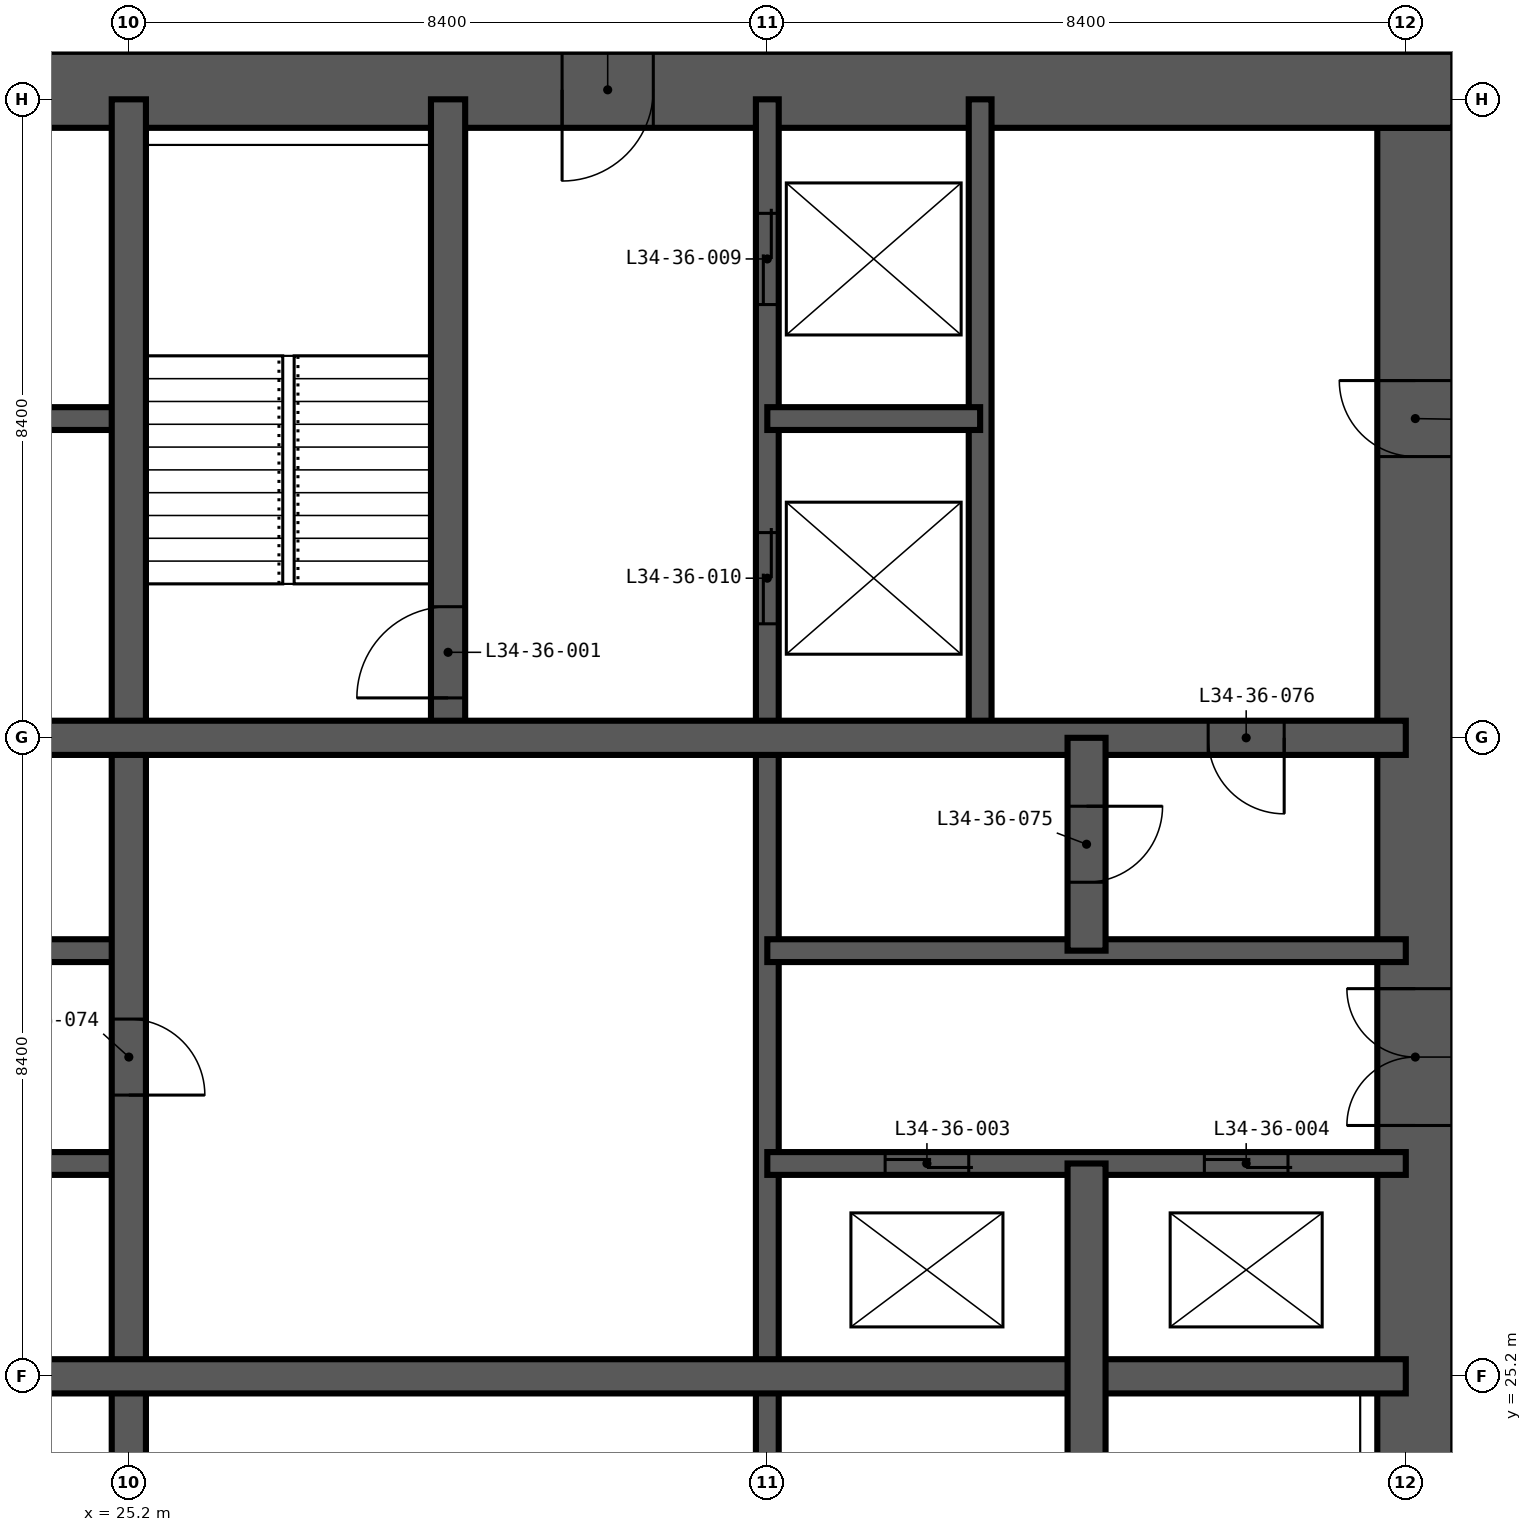
"""IFC4 building model, lengths in metres.
Left out: names, types, materials, properties, quantities, classifications, styles, units other than length and angle.
Written with IfcOpenShell. Run it as: python <this file> out.ifc"""

import sys

from ifc_helpers import new_model, si_unit, direction, frame, frame_2d, origin, place, context, subcontext, project, spatial, rectangle, extrude, element, fill, save


model = new_model("IFC4")
c1 = context("Model", 3, precision=1e-05, world=origin(), true_north=direction((0.0, 1.0)))
c2 = subcontext(c1, "Body", "Model", "MODEL_VIEW")
j1 = project(units=[si_unit("LENGTHUNIT", "METRE"), si_unit("PLANEANGLEUNIT", "RADIAN")], contexts=[c1])
p1 = place(None, origin())
s1 = spatial("IfcSite", under=j1, at=p1, CompositionType="ELEMENT")
p2 = place(p1, origin())
s2 = spatial("IfcBuilding", under=s1, at=p2, CompositionType="ELEMENT")
p3 = place(p2, frame((0.0, 0.0, 133.2)))
s3 = spatial("IfcBuildingStorey", under=s2, at=p3, CompositionType="ELEMENT", Elevation=133.2)
p4 = place(p3, frame((42.125, 17.175, -0.35), z_axis=(0.0, 0.0, 1.0), x_axis=(0.0, 1.0, 0.0)))
e1 = element("IfcWall", 1, at=p4, inside=s3, PredefinedType="SHEAR", context=c2, shape_type="SweptSolid", body=[
    extrude(rectangle(XDim=24.45, YDim=1.0, at=frame_2d((12.225, 0.0))), origin(), (0.0, 0.0, 1.0), 3.6),
])
p5 = place(p4, frame((0.425, 0.0, 0.35)))
e2 = element("IfcOpeningElement", 2, at=p5, cuts=e1, PredefinedType="OPENING", context=c2, shape_type="SweptSolid", body=[
    extrude(rectangle(XDim=1.2, YDim=2.2, at=frame_2d((0.6, 1.1))), frame((0.0, 0.51, 0.0), z_axis=(0.0, -1.0, 0.0), x_axis=(1.0, 0.0, 0.0)), (0.0, 0.0, 1.0), 1.02),
])
p6 = place(p4, frame((11.325, 0.0, 0.35)))
e3 = element("IfcOpeningElement", 3, at=p6, cuts=e1, PredefinedType="OPENING", context=c2, shape_type="SweptSolid", body=[
    extrude(rectangle(XDim=1.8, YDim=2.2, at=frame_2d((0.9, 1.1))), frame((0.0, 0.51, 0.0), z_axis=(0.0, -1.0, 0.0), x_axis=(1.0, 0.0, 0.0)), (0.0, 0.0, 1.0), 1.02),
])
p7 = place(p4, frame((20.125, 0.0, 0.35)))
e4 = element("IfcOpeningElement", 4, at=p7, cuts=e1, PredefinedType="OPENING", context=c2, shape_type="SweptSolid", body=[
    extrude(rectangle(XDim=1.0, YDim=2.1, at=frame_2d((0.5, 1.05))), frame((0.0, 0.51, 0.0), z_axis=(0.0, -1.0, 0.0), x_axis=(1.0, 0.0, 0.0)), (0.0, 0.0, 1.0), 1.02),
])
p8 = place(p3, frame((42.625, 42.125, -0.35), z_axis=(0.0, 0.0, 1.0), x_axis=(-1.0, 0.0, 0.0)))
e5 = element("IfcWall", 5, at=p8, inside=s3, PredefinedType="SHEAR", context=c2, shape_type="SweptSolid", body=[
    extrude(rectangle(XDim=26.45, YDim=1.0, at=frame_2d((13.225, 0.0))), origin(), (0.0, 0.0, 1.0), 3.6),
])
p9 = place(p8, frame((21.125, 0.0, 0.35)))
e6 = element("IfcOpeningElement", 6, at=p9, cuts=e5, PredefinedType="OPENING", context=c2, shape_type="SweptSolid", body=[
    extrude(rectangle(XDim=1.0, YDim=2.1, at=frame_2d((0.5, 1.05))), frame((0.0, 0.51, 0.0), z_axis=(0.0, -1.0, 0.0), x_axis=(1.0, 0.0, 0.0)), (0.0, 0.0, 1.0), 1.02),
])
p10 = place(p8, frame((10.525, 0.0, 0.35)))
e7 = element("IfcOpeningElement", 7, at=p10, cuts=e5, PredefinedType="OPENING", context=c2, shape_type="SweptSolid", body=[
    extrude(rectangle(XDim=1.2, YDim=2.2, at=frame_2d((0.6, 1.1))), frame((0.0, 0.51, 0.0), z_axis=(0.0, -1.0, 0.0), x_axis=(1.0, 0.0, 0.0)), (0.0, 0.0, 1.0), 1.02),
])
p11 = place(p3, frame((33.6, 16.8, -0.35), z_axis=(0.0, 0.0, 1.0), x_axis=(0.0, 1.0, 0.0)))
e8 = element("IfcWall", 8, at=p11, inside=s3, PredefinedType="SHEAR", context=c2, shape_type="SweptSolid", body=[
    extrude(rectangle(XDim=25.2, YDim=0.3, at=frame_2d((12.6, 0.0))), origin(), (0.0, 0.0, 1.0), 3.6),
])
p12 = place(p11, frame((22.5, 0.0, 0.35)))
e9 = element("IfcOpeningElement", 9, at=p12, cuts=e8, PredefinedType="OPENING", context=c2, shape_type="SweptSolid", body=[
    extrude(rectangle(XDim=1.2, YDim=2.2, at=frame_2d((0.6, 1.1))), frame((0.0, 0.16, 0.0), z_axis=(0.0, -1.0, 0.0), x_axis=(1.0, 0.0, 0.0)), (0.0, 0.0, 1.0), 0.32),
])
p13 = place(p11, frame((18.3, 0.0, 0.35)))
e10 = element("IfcOpeningElement", 10, at=p13, cuts=e8, PredefinedType="OPENING", context=c2, shape_type="SweptSolid", body=[
    extrude(rectangle(XDim=1.2, YDim=2.2, at=frame_2d((0.6, 1.1))), frame((0.0, 0.16, 0.0), z_axis=(0.0, -1.0, 0.0), x_axis=(1.0, 0.0, 0.0)), (0.0, 0.0, 1.0), 0.32),
])
p14 = place(p3, frame((36.4, 33.6, -0.35), z_axis=(0.0, 0.0, 1.0), x_axis=(0.0, 1.0, 0.0)))
e11 = element("IfcWall", 11, at=p14, inside=s3, PredefinedType="SHEAR", context=c2, shape_type="SweptSolid", body=[
    extrude(rectangle(XDim=8.4, YDim=0.3, at=frame_2d((4.2, 0.0))), origin(), (0.0, 0.0, 1.0), 3.6),
])
p15 = place(p3, frame((16.8, 28.0, -0.35), z_axis=(0.0, 0.0, 1.0), x_axis=(1.0, 0.0, 0.0)))
e12 = element("IfcWall", 12, at=p15, inside=s3, PredefinedType="SHEAR", context=c2, shape_type="SweptSolid", body=[
    extrude(rectangle(XDim=8.4, YDim=0.3, at=frame_2d((4.2, 0.0))), origin(), (0.0, 0.0, 1.0), 3.6),
])
p16 = place(p15, frame((1.55, 0.0, 0.35)))
e13 = element("IfcOpeningElement", 13, at=p16, cuts=e12, PredefinedType="OPENING", context=c2, shape_type="SweptSolid", body=[
    extrude(rectangle(XDim=1.1, YDim=2.2, at=frame_2d((0.55, 1.1))), frame((0.0, 0.16, 0.0), z_axis=(0.0, -1.0, 0.0), x_axis=(1.0, 0.0, 0.0)), (0.0, 0.0, 1.0), 0.32),
])
p17 = place(p15, frame((5.75, 0.0, 0.35)))
e14 = element("IfcOpeningElement", 14, at=p17, cuts=e12, PredefinedType="OPENING", context=c2, shape_type="SweptSolid", body=[
    extrude(rectangle(XDim=1.1, YDim=2.2, at=frame_2d((0.55, 1.1))), frame((0.0, 0.16, 0.0), z_axis=(0.0, -1.0, 0.0), x_axis=(1.0, 0.0, 0.0)), (0.0, 0.0, 1.0), 0.32),
])
p18 = place(p3, frame((33.6, 28.0, -0.35), z_axis=(0.0, 0.0, 1.0), x_axis=(1.0, 0.0, 0.0)))
e15 = element("IfcWall", 15, at=p18, inside=s3, PredefinedType="SHEAR", context=c2, shape_type="SweptSolid", body=[
    extrude(rectangle(XDim=8.4, YDim=0.3, at=frame_2d((4.2, 0.0))), origin(), (0.0, 0.0, 1.0), 3.6),
])
p19 = place(p18, frame((1.55, 0.0, 0.35)))
e16 = element("IfcOpeningElement", 16, at=p19, cuts=e15, PredefinedType="OPENING", context=c2, shape_type="SweptSolid", body=[
    extrude(rectangle(XDim=1.1, YDim=2.2, at=frame_2d((0.55, 1.1))), frame((0.0, 0.16, 0.0), z_axis=(0.0, -1.0, 0.0), x_axis=(1.0, 0.0, 0.0)), (0.0, 0.0, 1.0), 0.32),
])
p20 = place(p18, frame((5.75, 0.0, 0.35)))
e17 = element("IfcOpeningElement", 17, at=p20, cuts=e15, PredefinedType="OPENING", context=c2, shape_type="SweptSolid", body=[
    extrude(rectangle(XDim=1.1, YDim=2.2, at=frame_2d((0.55, 1.1))), frame((0.0, 0.16, 0.0), z_axis=(0.0, -1.0, 0.0), x_axis=(1.0, 0.0, 0.0)), (0.0, 0.0, 1.0), 0.32),
])
p21 = place(p3, frame((16.8, 30.8, -0.35), z_axis=(0.0, 0.0, 1.0), x_axis=(1.0, 0.0, 0.0)))
e18 = element("IfcWall", 18, at=p21, inside=s3, PredefinedType="SHEAR", context=c2, shape_type="SweptSolid", body=[
    extrude(rectangle(XDim=8.4, YDim=0.3, at=frame_2d((4.2, 0.0))), origin(), (0.0, 0.0, 1.0), 3.6),
])
p22 = place(p21, frame((1.55, 0.0, 0.35)))
e19 = element("IfcOpeningElement", 19, at=p22, cuts=e18, PredefinedType="OPENING", context=c2, shape_type="SweptSolid", body=[
    extrude(rectangle(XDim=1.1, YDim=2.2, at=frame_2d((0.55, 1.1))), frame((0.0, 0.16, 0.0), z_axis=(0.0, -1.0, 0.0), x_axis=(1.0, 0.0, 0.0)), (0.0, 0.0, 1.0), 0.32),
])
p23 = place(p21, frame((5.75, 0.0, 0.35)))
e20 = element("IfcOpeningElement", 20, at=p23, cuts=e18, PredefinedType="OPENING", context=c2, shape_type="SweptSolid", body=[
    extrude(rectangle(XDim=1.1, YDim=2.2, at=frame_2d((0.55, 1.1))), frame((0.0, 0.16, 0.0), z_axis=(0.0, -1.0, 0.0), x_axis=(1.0, 0.0, 0.0)), (0.0, 0.0, 1.0), 0.32),
])
for number, where, z_axis, x_axis in (
    (21, (33.6, 30.8, -0.35), (0.0, 0.0, 1.0), (1.0, 0.0, 0.0)),
    (22, (16.8, 37.8, -0.35), (0.0, 0.0, 1.0), (1.0, 0.0, 0.0)),
):
    element("IfcWall", number, at=place(p3, frame(where, z_axis=z_axis, x_axis=x_axis)), inside=s3, PredefinedType="SHEAR", context=c2, shape_type="SweptSolid", body=[
        extrude(rectangle(XDim=8.4, YDim=0.3, at=frame_2d((4.2, 0.0))), origin(), (0.0, 0.0, 1.0), 3.6),
    ])
p24 = place(p3, frame((33.6, 37.8, -0.35), z_axis=(0.0, 0.0, 1.0), x_axis=(1.0, 0.0, 0.0)))
e23 = element("IfcWall", 23, at=p24, inside=s3, PredefinedType="SHEAR", context=c2, shape_type="SweptSolid", body=[
    extrude(rectangle(XDim=2.8, YDim=0.3, at=frame_2d((1.4, 0.0))), origin(), (0.0, 0.0, 1.0), 3.6),
])
p25 = place(p3, frame((25.2, 16.8, -0.35), z_axis=(0.0, 0.0, 1.0), x_axis=(0.0, 1.0, 0.0)))
e24 = element("IfcWall", 24, at=p25, inside=s3, PredefinedType="SHEAR", context=c2, shape_type="SweptSolid", body=[
    extrude(rectangle(XDim=25.2, YDim=0.45, at=frame_2d((12.6, 0.0))), origin(), (0.0, 0.0, 1.0), 3.6),
])
p26 = place(p25, frame((12.1, 0.0, 0.35)))
e25 = element("IfcOpeningElement", 25, at=p26, cuts=e24, PredefinedType="OPENING", context=c2, shape_type="SweptSolid", body=[
    extrude(rectangle(XDim=1.0, YDim=2.1, at=frame_2d((0.5, 1.05))), frame((0.0, 0.235, 0.0), z_axis=(0.0, -1.0, 0.0), x_axis=(1.0, 0.0, 0.0)), (0.0, 0.0, 1.0), 0.47),
])
p27 = place(p3, frame((29.4, 33.6, -0.35), z_axis=(0.0, 0.0, 1.0), x_axis=(0.0, 1.0, 0.0)))
e26 = element("IfcWall", 26, at=p27, inside=s3, PredefinedType="SHEAR", context=c2, shape_type="SweptSolid", body=[
    extrude(rectangle(XDim=8.4, YDim=0.45, at=frame_2d((4.2, 0.0))), origin(), (0.0, 0.0, 1.0), 3.6),
])
p28 = place(p27, frame((0.525, 0.0, 0.35)))
e27 = element("IfcOpeningElement", 27, at=p28, cuts=e26, PredefinedType="OPENING", context=c2, shape_type="SweptSolid", body=[
    extrude(rectangle(XDim=1.2, YDim=2.2, at=frame_2d((0.6, 1.1))), frame((0.0, 0.235, 0.0), z_axis=(0.0, -1.0, 0.0), x_axis=(1.0, 0.0, 0.0)), (0.0, 0.0, 1.0), 0.47),
])
p29 = place(p3, frame((16.8, 25.2, -0.35), z_axis=(0.0, 0.0, 1.0), x_axis=(1.0, 0.0, 0.0)))
e28 = element("IfcWall", 28, at=p29, inside=s3, PredefinedType="SHEAR", context=c2, shape_type="SweptSolid", body=[
    extrude(rectangle(XDim=25.2, YDim=0.45, at=frame_2d((12.6, 0.0))), origin(), (0.0, 0.0, 1.0), 3.6),
])
p30 = place(p3, frame((16.8, 33.6, -0.35), z_axis=(0.0, 0.0, 1.0), x_axis=(1.0, 0.0, 0.0)))
e29 = element("IfcWall", 29, at=p30, inside=s3, PredefinedType="SHEAR", context=c2, shape_type="SweptSolid", body=[
    extrude(rectangle(XDim=25.2, YDim=0.45, at=frame_2d((12.6, 0.0))), origin(), (0.0, 0.0, 1.0), 3.6),
])
p31 = place(p30, frame((22.6, 0.0, 0.35)))
e30 = element("IfcOpeningElement", 30, at=p31, cuts=e29, PredefinedType="OPENING", context=c2, shape_type="SweptSolid", body=[
    extrude(rectangle(XDim=1.0, YDim=2.1, at=frame_2d((0.5, 1.05))), frame((0.0, 0.235, 0.0), z_axis=(0.0, -1.0, 0.0), x_axis=(1.0, 0.0, 0.0)), (0.0, 0.0, 1.0), 0.47),
])
p32 = place(p3, frame((37.8, 16.8, -0.35), z_axis=(0.0, 0.0, 1.0), x_axis=(0.0, 1.0, 0.0)))
e31 = element("IfcWall", 31, at=p32, inside=s3, PredefinedType="SHEAR", context=c2, shape_type="SweptSolid", body=[
    extrude(rectangle(XDim=11.2, YDim=0.5, at=frame_2d((5.6, 0.0))), origin(), (0.0, 0.0, 1.0), 3.6),
])
p33 = place(p3, frame((37.8, 30.8, -0.35), z_axis=(0.0, 0.0, 1.0), x_axis=(0.0, 1.0, 0.0)))
e32 = element("IfcWall", 32, at=p33, inside=s3, PredefinedType="SHEAR", context=c2, shape_type="SweptSolid", body=[
    extrude(rectangle(XDim=2.8, YDim=0.5, at=frame_2d((1.4, 0.0))), origin(), (0.0, 0.0, 1.0), 3.6),
])
p34 = place(p33, frame((0.9, 0.0, 0.35)))
e33 = element("IfcOpeningElement", 33, at=p34, cuts=e32, PredefinedType="OPENING", context=c2, shape_type="SweptSolid", body=[
    extrude(rectangle(XDim=1.0, YDim=2.1, at=frame_2d((0.5, 1.05))), frame((0.0, 0.26, 0.0), z_axis=(0.0, -1.0, 0.0), x_axis=(1.0, 0.0, 0.0)), (0.0, 0.0, 1.0), 0.52),
])
p35 = place(p28, origin())
e34 = element("IfcDoor", 34, at=p35, inside=s3, OperationType="SINGLE_SWING_LEFT", PredefinedType="DOOR", context=c2, shape_type="SweptSolid", body=[
    extrude(rectangle(XDim=1.2, YDim=2.2, at=frame_2d((0.6, 1.1))), frame((0.0, 0.025, 0.0), z_axis=(0.0, -1.0, 0.0), x_axis=(1.0, 0.0, 0.0)), (0.0, 0.0, 1.0), 0.05),
])
fill(e27, e34)
p36 = place(p19, origin())
e35 = element("IfcDoor", 35, at=p36, inside=s3, OperationType="DOUBLE_DOOR_SLIDING", PredefinedType="DOOR", context=c2, shape_type="SweptSolid", body=[
    extrude(rectangle(XDim=1.1, YDim=2.2, at=frame_2d((0.55, 1.1))), frame((0.0, 0.025, 0.0), z_axis=(0.0, -1.0, 0.0), x_axis=(1.0, 0.0, 0.0)), (0.0, 0.0, 1.0), 0.05),
])
fill(e16, e35)
p37 = place(p20, origin())
e36 = element("IfcDoor", 36, at=p37, inside=s3, OperationType="DOUBLE_DOOR_SLIDING", PredefinedType="DOOR", context=c2, shape_type="SweptSolid", body=[
    extrude(rectangle(XDim=1.1, YDim=2.2, at=frame_2d((0.55, 1.1))), frame((0.0, 0.025, 0.0), z_axis=(0.0, -1.0, 0.0), x_axis=(1.0, 0.0, 0.0)), (0.0, 0.0, 1.0), 0.05),
])
fill(e17, e36)
p38 = place(p12, origin())
e37 = element("IfcDoor", 37, at=p38, inside=s3, OperationType="DOUBLE_DOOR_SLIDING", PredefinedType="DOOR", context=c2, shape_type="SweptSolid", body=[
    extrude(rectangle(XDim=1.2, YDim=2.2, at=frame_2d((0.6, 1.1))), frame((0.0, 0.025, 0.0), z_axis=(0.0, -1.0, 0.0), x_axis=(1.0, 0.0, 0.0)), (0.0, 0.0, 1.0), 0.05),
])
fill(e9, e37)
p39 = place(p13, origin())
e38 = element("IfcDoor", 38, at=p39, inside=s3, OperationType="DOUBLE_DOOR_SLIDING", PredefinedType="DOOR", context=c2, shape_type="SweptSolid", body=[
    extrude(rectangle(XDim=1.2, YDim=2.2, at=frame_2d((0.6, 1.1))), frame((0.0, 0.025, 0.0), z_axis=(0.0, -1.0, 0.0), x_axis=(1.0, 0.0, 0.0)), (0.0, 0.0, 1.0), 0.05),
])
fill(e10, e38)
p40 = place(p26, frame((1.0, 0.0, 0.0), z_axis=(0.0, 0.0, 1.0), x_axis=(-1.0, 0.0, 0.0)))
e39 = element("IfcDoor", 39, at=p40, inside=s3, OperationType="SINGLE_SWING_RIGHT", PredefinedType="DOOR", context=c2, shape_type="SweptSolid", body=[
    extrude(rectangle(XDim=1.0, YDim=2.1, at=frame_2d((0.5, 1.05))), frame((0.0, 0.025, 0.0), z_axis=(0.0, -1.0, 0.0), x_axis=(1.0, 0.0, 0.0)), (0.0, 0.0, 1.0), 0.05),
])
fill(e25, e39)
p41 = place(p34, frame((1.0, 0.0, 0.0), z_axis=(0.0, 0.0, 1.0), x_axis=(-1.0, 0.0, 0.0)))
e40 = element("IfcDoor", 40, at=p41, inside=s3, OperationType="SINGLE_SWING_LEFT", PredefinedType="DOOR", context=c2, shape_type="SweptSolid", body=[
    extrude(rectangle(XDim=1.0, YDim=2.1, at=frame_2d((0.5, 1.05))), frame((0.0, 0.025, 0.0), z_axis=(0.0, -1.0, 0.0), x_axis=(1.0, 0.0, 0.0)), (0.0, 0.0, 1.0), 0.05),
])
fill(e33, e40)
p42 = place(p31, frame((1.0, 0.0, 0.0), z_axis=(0.0, 0.0, 1.0), x_axis=(-1.0, 0.0, 0.0)))
e41 = element("IfcDoor", 41, at=p42, inside=s3, OperationType="SINGLE_SWING_LEFT", PredefinedType="DOOR", context=c2, shape_type="SweptSolid", body=[
    extrude(rectangle(XDim=1.0, YDim=2.1, at=frame_2d((0.5, 1.05))), frame((0.0, 0.025, 0.0), z_axis=(0.0, -1.0, 0.0), x_axis=(1.0, 0.0, 0.0)), (0.0, 0.0, 1.0), 0.05),
])
fill(e30, e41)
p43 = place(p6, origin())
e42 = element("IfcDoor", 42, at=p43, inside=s3, OperationType="DOUBLE_DOOR_DOUBLE_SWING", PredefinedType="DOOR", context=c2, shape_type="SweptSolid", body=[
    extrude(rectangle(XDim=1.8, YDim=2.2, at=frame_2d((0.9, 1.1))), frame((0.0, 0.025, 0.0), z_axis=(0.0, -1.0, 0.0), x_axis=(1.0, 0.0, 0.0)), (0.0, 0.0, 1.0), 0.05),
])
fill(e3, e42)
p44 = place(p10, origin())
e43 = element("IfcDoor", 43, at=p44, inside=s3, OperationType="SINGLE_SWING_RIGHT", PredefinedType="DOOR", context=c2, shape_type="SweptSolid", body=[
    extrude(rectangle(XDim=1.2, YDim=2.2, at=frame_2d((0.6, 1.1))), frame((0.0, 0.025, 0.0), z_axis=(0.0, -1.0, 0.0), x_axis=(1.0, 0.0, 0.0)), (0.0, 0.0, 1.0), 0.05),
])
fill(e7, e43)
p45 = place(p7, origin())
e44 = element("IfcDoor", 44, at=p45, inside=s3, OperationType="SINGLE_SWING_RIGHT", PredefinedType="DOOR", context=c2, shape_type="SweptSolid", body=[
    extrude(rectangle(XDim=1.0, YDim=2.1, at=frame_2d((0.5, 1.05))), frame((0.0, 0.025, 0.0), z_axis=(0.0, -1.0, 0.0), x_axis=(1.0, 0.0, 0.0)), (0.0, 0.0, 1.0), 0.05),
])
fill(e4, e44)
save(model, sys.argv[1])
